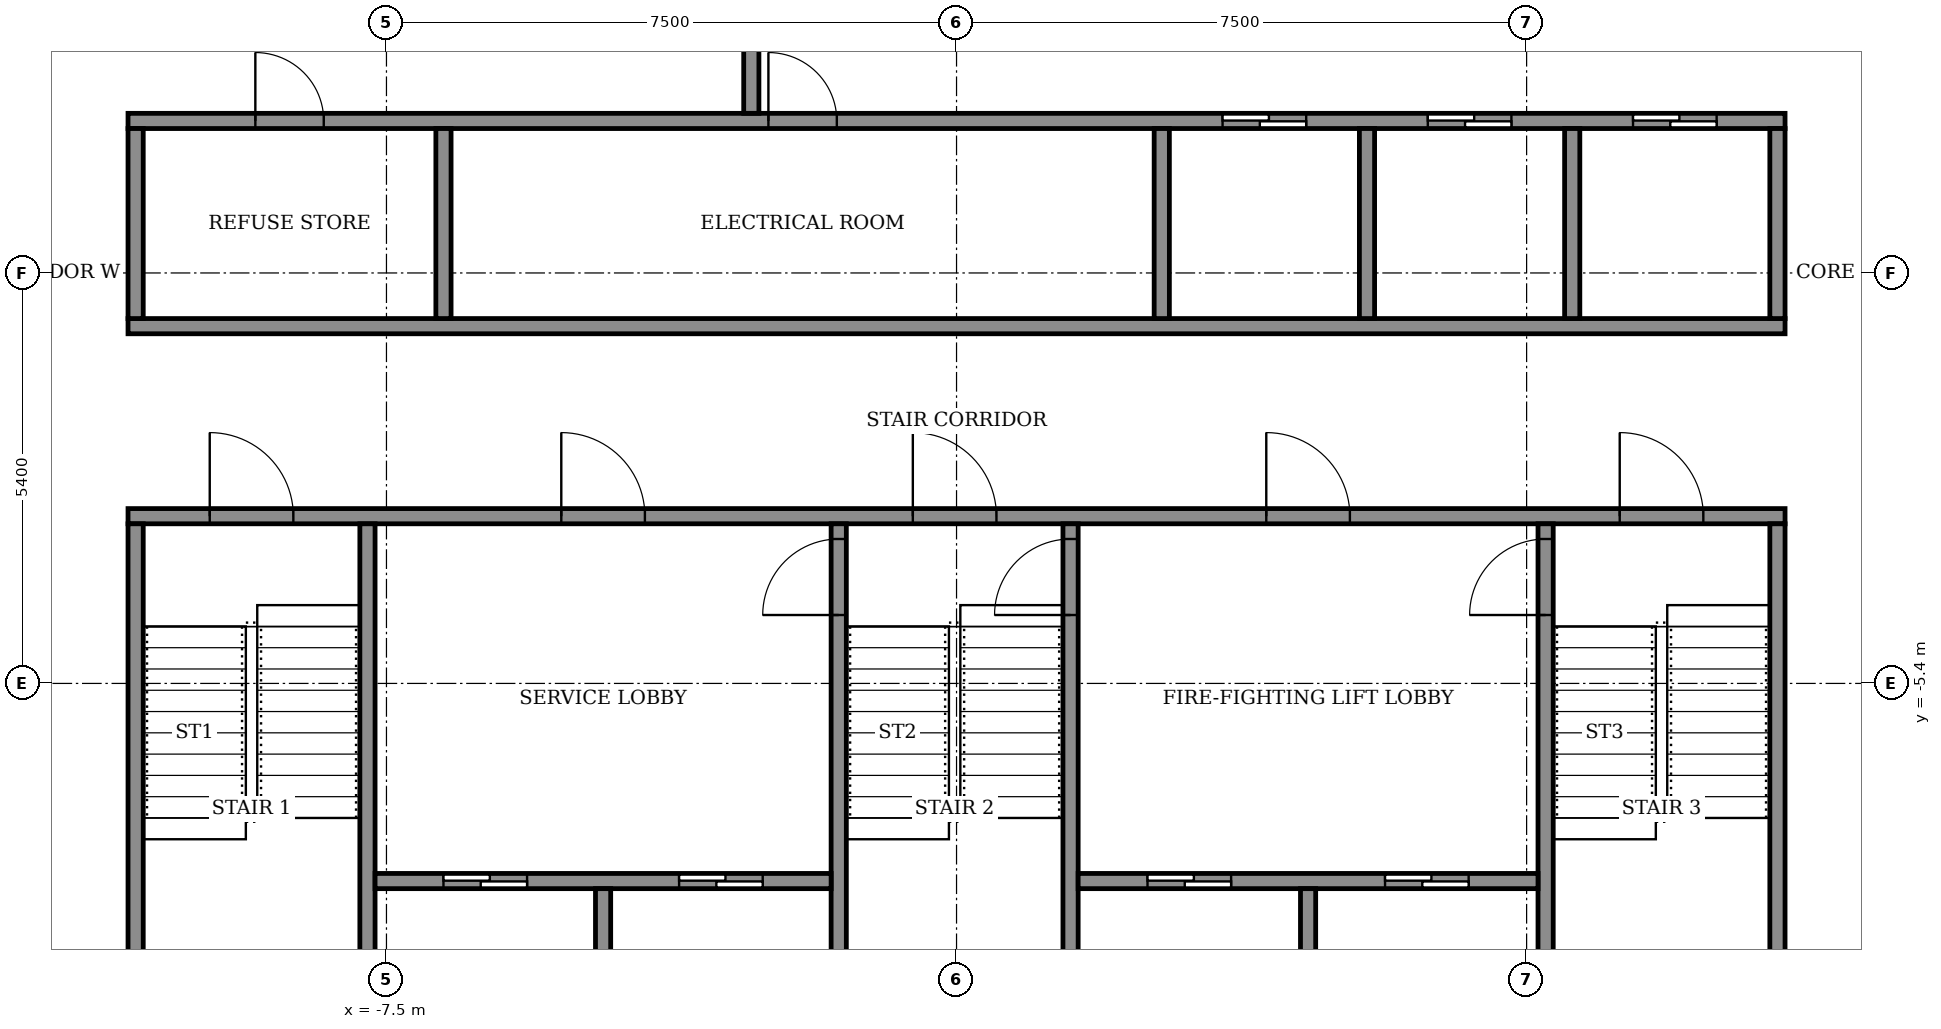
"""IFC4 building model, lengths in metres.
Left out: names, types, materials, properties, quantities, classifications, styles, units other than length and angle.
Written with IfcOpenShell. Run it as: python <this file> out.ifc"""

import sys

from ifc_helpers import new_model, si_unit, direction, frame, frame_2d, origin, place, context, subcontext, project, spatial, rectangle, extrude, element, fill, save


model = new_model("IFC4")
c1 = context("Model", 3, precision=1e-05, world=origin(), true_north=direction((0.0, 1.0)))
c2 = subcontext(c1, "Body", "Model", "MODEL_VIEW")
j1 = project(units=[si_unit("LENGTHUNIT", "METRE"), si_unit("PLANEANGLEUNIT", "RADIAN")], contexts=[c1])
p1 = place(None, origin())
s1 = spatial("IfcSite", under=j1, at=p1, CompositionType="ELEMENT")
p2 = place(p1, origin())
s2 = spatial("IfcBuilding", under=s1, at=p2, CompositionType="ELEMENT")
p3 = place(p2, frame((0.0, 0.0, 140.9)))
s3 = spatial("IfcBuildingStorey", under=s2, at=p3, CompositionType="ELEMENT", Elevation=140.9)
p4 = place(p3, frame((-10.9, -3.2, 0.0), z_axis=(0.0, 0.0, 1.0), x_axis=(1.0, 0.0, 0.0)))
e1 = element("IfcWall", 1, at=p4, inside=s3, PredefinedType="SHEAR", context=c2, shape_type="SweptSolid", body=[
    extrude(rectangle(XDim=21.8, YDim=0.2, at=frame_2d((10.9, 0.0))), origin(), (0.0, 0.0, 1.0), 3.05),
])
p5 = place(p4, frame((1.075, 0.0, 0.0)))
e2 = element("IfcOpeningElement", 2, at=p5, cuts=e1, PredefinedType="OPENING", context=c2, shape_type="SweptSolid", body=[
    extrude(rectangle(XDim=1.1, YDim=2.1, at=frame_2d((0.55, 1.05))), frame((0.0, 0.11, 0.0), z_axis=(0.0, -1.0, 0.0), x_axis=(1.0, 0.0, 0.0)), (0.0, 0.0, 1.0), 0.22),
])
p6 = place(p4, frame((10.325, 0.0, 0.0)))
e3 = element("IfcOpeningElement", 3, at=p6, cuts=e1, PredefinedType="OPENING", context=c2, shape_type="SweptSolid", body=[
    extrude(rectangle(XDim=1.1, YDim=2.1, at=frame_2d((0.55, 1.05))), frame((0.0, 0.11, 0.0), z_axis=(0.0, -1.0, 0.0), x_axis=(1.0, 0.0, 0.0)), (0.0, 0.0, 1.0), 0.22),
])
p7 = place(p4, frame((19.625, 0.0, 0.0)))
e4 = element("IfcOpeningElement", 4, at=p7, cuts=e1, PredefinedType="OPENING", context=c2, shape_type="SweptSolid", body=[
    extrude(rectangle(XDim=1.1, YDim=2.1, at=frame_2d((0.55, 1.05))), frame((0.0, 0.11, 0.0), z_axis=(0.0, -1.0, 0.0), x_axis=(1.0, 0.0, 0.0)), (0.0, 0.0, 1.0), 0.22),
])
p8 = place(p4, frame((5.7, 0.0, 0.0)))
e5 = element("IfcOpeningElement", 5, at=p8, cuts=e1, PredefinedType="OPENING", context=c2, shape_type="SweptSolid", body=[
    extrude(rectangle(XDim=1.1, YDim=2.1, at=frame_2d((0.55, 1.05))), frame((0.0, 0.11, 0.0), z_axis=(0.0, -1.0, 0.0), x_axis=(1.0, 0.0, 0.0)), (0.0, 0.0, 1.0), 0.22),
])
p9 = place(p4, frame((14.975, 0.0, 0.0)))
e6 = element("IfcOpeningElement", 6, at=p9, cuts=e1, PredefinedType="OPENING", context=c2, shape_type="SweptSolid", body=[
    extrude(rectangle(XDim=1.1, YDim=2.1, at=frame_2d((0.55, 1.05))), frame((0.0, 0.11, 0.0), z_axis=(0.0, -1.0, 0.0), x_axis=(1.0, 0.0, 0.0)), (0.0, 0.0, 1.0), 0.22),
])
p10 = place(p3, frame((-10.9, -0.7, 0.0), z_axis=(0.0, 0.0, 1.0), x_axis=(1.0, 0.0, 0.0)))
e7 = element("IfcWall", 7, at=p10, inside=s3, PredefinedType="SHEAR", context=c2, shape_type="SweptSolid", body=[
    extrude(rectangle(XDim=21.8, YDim=0.2, at=frame_2d((10.9, 0.0))), origin(), (0.0, 0.0, 1.0), 3.05),
])
p11 = place(p3, frame((-10.9, 2.0, 0.0), z_axis=(0.0, 0.0, 1.0), x_axis=(1.0, 0.0, 0.0)))
e8 = element("IfcWall", 8, at=p11, inside=s3, PredefinedType="SHEAR", context=c2, shape_type="SweptSolid", body=[
    extrude(rectangle(XDim=21.8, YDim=0.2, at=frame_2d((10.9, 0.0))), origin(), (0.0, 0.0, 1.0), 3.05),
])
p12 = place(p11, frame((14.4, 0.0, 0.0)))
e9 = element("IfcOpeningElement", 9, at=p12, cuts=e8, PredefinedType="OPENING", context=c2, shape_type="SweptSolid", body=[
    extrude(rectangle(XDim=1.1, YDim=2.1, at=frame_2d((0.55, 1.05))), frame((0.0, 0.11, 0.0), z_axis=(0.0, -1.0, 0.0), x_axis=(1.0, 0.0, 0.0)), (0.0, 0.0, 1.0), 0.22),
])
p13 = place(p11, frame((17.1, 0.0, 0.0)))
e10 = element("IfcOpeningElement", 10, at=p13, cuts=e8, PredefinedType="OPENING", context=c2, shape_type="SweptSolid", body=[
    extrude(rectangle(XDim=1.1, YDim=2.1, at=frame_2d((0.55, 1.05))), frame((0.0, 0.11, 0.0), z_axis=(0.0, -1.0, 0.0), x_axis=(1.0, 0.0, 0.0)), (0.0, 0.0, 1.0), 0.22),
])
p14 = place(p11, frame((19.8, 0.0, 0.0)))
e11 = element("IfcOpeningElement", 11, at=p14, cuts=e8, PredefinedType="OPENING", context=c2, shape_type="SweptSolid", body=[
    extrude(rectangle(XDim=1.1, YDim=2.1, at=frame_2d((0.55, 1.05))), frame((0.0, 0.11, 0.0), z_axis=(0.0, -1.0, 0.0), x_axis=(1.0, 0.0, 0.0)), (0.0, 0.0, 1.0), 0.22),
])
p15 = place(p11, frame((1.675, 0.0, 0.0)))
e12 = element("IfcOpeningElement", 12, at=p15, cuts=e8, PredefinedType="OPENING", context=c2, shape_type="SweptSolid", body=[
    extrude(rectangle(XDim=0.9, YDim=2.1, at=frame_2d((0.45, 1.05))), frame((0.0, 0.11, 0.0), z_axis=(0.0, -1.0, 0.0), x_axis=(1.0, 0.0, 0.0)), (0.0, 0.0, 1.0), 0.22),
])
p16 = place(p11, frame((8.425, 0.0, 0.0)))
e13 = element("IfcOpeningElement", 13, at=p16, cuts=e8, PredefinedType="OPENING", context=c2, shape_type="SweptSolid", body=[
    extrude(rectangle(XDim=0.9, YDim=2.1, at=frame_2d((0.45, 1.05))), frame((0.0, 0.11, 0.0), z_axis=(0.0, -1.0, 0.0), x_axis=(1.0, 0.0, 0.0)), (0.0, 0.0, 1.0), 0.22),
])
for number, where, z_axis, x_axis in (
    (14, (-10.8, -10.8, 0.0), (0.0, 0.0, 1.0), (0.0, 1.0, 0.0)),
    (15, (-7.75, -10.8, 0.0), (0.0, 0.0, 1.0), (0.0, 1.0, 0.0)),
):
    element("IfcWall", number, at=place(p3, frame(where, z_axis=z_axis, x_axis=x_axis)), inside=s3, PredefinedType="SHEAR", context=c2, shape_type="SweptSolid", body=[
        extrude(rectangle(XDim=7.5, YDim=0.2, at=frame_2d((3.75, 0.0))), origin(), (0.0, 0.0, 1.0), 3.05),
    ])
p17 = place(p3, frame((-1.55, -10.8, 0.0), z_axis=(0.0, 0.0, 1.0), x_axis=(0.0, 1.0, 0.0)))
e16 = element("IfcWall", 16, at=p17, inside=s3, PredefinedType="SHEAR", context=c2, shape_type="SweptSolid", body=[
    extrude(rectangle(XDim=7.5, YDim=0.2, at=frame_2d((3.75, 0.0))), origin(), (0.0, 0.0, 1.0), 3.05),
])
p18 = place(p17, frame((6.3, 0.0, 0.0)))
e17 = element("IfcOpeningElement", 17, at=p18, cuts=e16, PredefinedType="OPENING", context=c2, shape_type="SweptSolid", body=[
    extrude(rectangle(XDim=1.0, YDim=2.1, at=frame_2d((0.5, 1.05))), frame((0.0, 0.11, 0.0), z_axis=(0.0, -1.0, 0.0), x_axis=(1.0, 0.0, 0.0)), (0.0, 0.0, 1.0), 0.22),
])
p19 = place(p3, frame((1.5, -10.8, 0.0), z_axis=(0.0, 0.0, 1.0), x_axis=(0.0, 1.0, 0.0)))
e18 = element("IfcWall", 18, at=p19, inside=s3, PredefinedType="SHEAR", context=c2, shape_type="SweptSolid", body=[
    extrude(rectangle(XDim=7.5, YDim=0.2, at=frame_2d((3.75, 0.0))), origin(), (0.0, 0.0, 1.0), 3.05),
])
p20 = place(p19, frame((6.3, 0.0, 0.0)))
e19 = element("IfcOpeningElement", 19, at=p20, cuts=e18, PredefinedType="OPENING", context=c2, shape_type="SweptSolid", body=[
    extrude(rectangle(XDim=1.0, YDim=2.1, at=frame_2d((0.5, 1.05))), frame((0.0, 0.11, 0.0), z_axis=(0.0, -1.0, 0.0), x_axis=(1.0, 0.0, 0.0)), (0.0, 0.0, 1.0), 0.22),
])
p21 = place(p3, frame((7.75, -10.8, 0.0), z_axis=(0.0, 0.0, 1.0), x_axis=(0.0, 1.0, 0.0)))
e20 = element("IfcWall", 20, at=p21, inside=s3, PredefinedType="SHEAR", context=c2, shape_type="SweptSolid", body=[
    extrude(rectangle(XDim=7.5, YDim=0.2, at=frame_2d((3.75, 0.0))), origin(), (0.0, 0.0, 1.0), 3.05),
])
p22 = place(p21, frame((6.3, 0.0, 0.0)))
e21 = element("IfcOpeningElement", 21, at=p22, cuts=e20, PredefinedType="OPENING", context=c2, shape_type="SweptSolid", body=[
    extrude(rectangle(XDim=1.0, YDim=2.1, at=frame_2d((0.5, 1.05))), frame((0.0, 0.11, 0.0), z_axis=(0.0, -1.0, 0.0), x_axis=(1.0, 0.0, 0.0)), (0.0, 0.0, 1.0), 0.22),
])
p23 = place(p3, frame((10.8, -10.8, 0.0), z_axis=(0.0, 0.0, 1.0), x_axis=(0.0, 1.0, 0.0)))
e22 = element("IfcWall", 22, at=p23, inside=s3, PredefinedType="SHEAR", context=c2, shape_type="SweptSolid", body=[
    extrude(rectangle(XDim=7.5, YDim=0.2, at=frame_2d((3.75, 0.0))), origin(), (0.0, 0.0, 1.0), 3.05),
])
p24 = place(p3, frame((-7.65, -8.0, 0.0), z_axis=(0.0, 0.0, 1.0), x_axis=(1.0, 0.0, 0.0)))
e23 = element("IfcWall", 23, at=p24, inside=s3, PredefinedType="SHEAR", context=c2, shape_type="SweptSolid", body=[
    extrude(rectangle(XDim=6.0, YDim=0.2, at=frame_2d((3.0, 0.0))), origin(), (0.0, 0.0, 1.0), 3.05),
])
p25 = place(p24, frame((0.9, 0.0, 0.0)))
e24 = element("IfcOpeningElement", 24, at=p25, cuts=e23, PredefinedType="OPENING", context=c2, shape_type="SweptSolid", body=[
    extrude(rectangle(XDim=1.1, YDim=2.1, at=frame_2d((0.55, 1.05))), frame((0.0, 0.11, 0.0), z_axis=(0.0, -1.0, 0.0), x_axis=(1.0, 0.0, 0.0)), (0.0, 0.0, 1.0), 0.22),
])
p26 = place(p24, frame((4.0, 0.0, 0.0)))
e25 = element("IfcOpeningElement", 25, at=p26, cuts=e23, PredefinedType="OPENING", context=c2, shape_type="SweptSolid", body=[
    extrude(rectangle(XDim=1.1, YDim=2.1, at=frame_2d((0.55, 1.05))), frame((0.0, 0.11, 0.0), z_axis=(0.0, -1.0, 0.0), x_axis=(1.0, 0.0, 0.0)), (0.0, 0.0, 1.0), 0.22),
])
p27 = place(p3, frame((-4.65, -10.8, 0.0), z_axis=(0.0, 0.0, 1.0), x_axis=(0.0, 1.0, 0.0)))
e26 = element("IfcWall", 26, at=p27, inside=s3, PredefinedType="SHEAR", context=c2, shape_type="SweptSolid", body=[
    extrude(rectangle(XDim=2.7, YDim=0.2, at=frame_2d((1.35, 0.0))), origin(), (0.0, 0.0, 1.0), 3.05),
])
p28 = place(p3, frame((1.6, -8.0, 0.0), z_axis=(0.0, 0.0, 1.0), x_axis=(1.0, 0.0, 0.0)))
e27 = element("IfcWall", 27, at=p28, inside=s3, PredefinedType="SHEAR", context=c2, shape_type="SweptSolid", body=[
    extrude(rectangle(XDim=6.05, YDim=0.2, at=frame_2d((3.025, 0.0))), origin(), (0.0, 0.0, 1.0), 3.05),
])
p29 = place(p28, frame((0.913, 0.0, 0.0)))
e28 = element("IfcOpeningElement", 28, at=p29, cuts=e27, PredefinedType="OPENING", context=c2, shape_type="SweptSolid", body=[
    extrude(rectangle(XDim=1.1, YDim=2.1, at=frame_2d((0.55, 1.05))), frame((0.0, 0.11, 0.0), z_axis=(0.0, -1.0, 0.0), x_axis=(1.0, 0.0, 0.0)), (0.0, 0.0, 1.0), 0.22),
])
p30 = place(p28, frame((4.038, 0.0, 0.0)))
e29 = element("IfcOpeningElement", 29, at=p30, cuts=e27, PredefinedType="OPENING", context=c2, shape_type="SweptSolid", body=[
    extrude(rectangle(XDim=1.1, YDim=2.1, at=frame_2d((0.55, 1.05))), frame((0.0, 0.11, 0.0), z_axis=(0.0, -1.0, 0.0), x_axis=(1.0, 0.0, 0.0)), (0.0, 0.0, 1.0), 0.22),
])
p31 = place(p3, frame((4.625, -10.8, 0.0), z_axis=(0.0, 0.0, 1.0), x_axis=(0.0, 1.0, 0.0)))
e30 = element("IfcWall", 30, at=p31, inside=s3, PredefinedType="SHEAR", context=c2, shape_type="SweptSolid", body=[
    extrude(rectangle(XDim=2.7, YDim=0.2, at=frame_2d((1.35, 0.0))), origin(), (0.0, 0.0, 1.0), 3.05),
])
for number, where, z_axis, x_axis in (
    (31, (-10.8, -0.6, 0.0), (0.0, 0.0, 1.0), (0.0, 1.0, 0.0)),
    (32, (-6.75, -0.6, 0.0), (0.0, 0.0, 1.0), (0.0, 1.0, 0.0)),
):
    element("IfcWall", number, at=place(p3, frame(where, z_axis=z_axis, x_axis=x_axis)), inside=s3, PredefinedType="STANDARD", context=c2, shape_type="SweptSolid", body=[
        extrude(rectangle(XDim=2.5, YDim=0.2, at=frame_2d((1.25, 0.0))), origin(), (0.0, 0.0, 1.0), 3.05),
    ])
for number, where, z_axis, x_axis in (
    (33, (2.7, -0.6, 0.0), (0.0, 0.0, 1.0), (0.0, 1.0, 0.0)),
    (34, (5.4, -0.6, 0.0), (0.0, 0.0, 1.0), (0.0, 1.0, 0.0)),
    (35, (8.1, -0.6, 0.0), (0.0, 0.0, 1.0), (0.0, 1.0, 0.0)),
    (36, (10.8, -0.6, 0.0), (0.0, 0.0, 1.0), (0.0, 1.0, 0.0)),
):
    element("IfcWall", number, at=place(p3, frame(where, z_axis=z_axis, x_axis=x_axis)), inside=s3, PredefinedType="SHEAR", context=c2, shape_type="SweptSolid", body=[
        extrude(rectangle(XDim=2.5, YDim=0.2, at=frame_2d((1.25, 0.0))), origin(), (0.0, 0.0, 1.0), 3.05),
    ])
p32 = place(p3, frame((-2.7, 2.1, 0.0), z_axis=(0.0, 0.0, 1.0), x_axis=(0.0, 1.0, 0.0)))
e37 = element("IfcWall", 37, at=p32, inside=s3, PredefinedType="STANDARD", context=c2, shape_type="SweptSolid", body=[
    extrude(rectangle(XDim=5.9, YDim=0.2, at=frame_2d((2.95, 0.0))), origin(), (0.0, 0.0, 1.0), 3.05),
])
p33 = place(p32, frame((2.35, 0.0, 0.0)))
e38 = element("IfcOpeningElement", 38, at=p33, cuts=e37, PredefinedType="OPENING", context=c2, shape_type="SweptSolid", body=[
    extrude(rectangle(XDim=1.2, YDim=2.1, at=frame_2d((0.6, 1.05))), frame((0.0, 0.11, 0.0), z_axis=(0.0, -1.0, 0.0), x_axis=(1.0, 0.0, 0.0)), (0.0, 0.0, 1.0), 0.22),
])
p34 = place(p12, origin())
e39 = element("IfcDoor", 39, at=p34, inside=s3, OperationType="SLIDING_TO_LEFT", PredefinedType="DOOR", context=c2, shape_type="SweptSolid", body=[
    extrude(rectangle(XDim=1.1, YDim=2.1, at=frame_2d((0.55, 1.05))), frame((0.0, 0.025, 0.0), z_axis=(0.0, -1.0, 0.0), x_axis=(1.0, 0.0, 0.0)), (0.0, 0.0, 1.0), 0.05),
])
fill(e9, e39)
p35 = place(p13, origin())
e40 = element("IfcDoor", 40, at=p35, inside=s3, OperationType="SLIDING_TO_LEFT", PredefinedType="DOOR", context=c2, shape_type="SweptSolid", body=[
    extrude(rectangle(XDim=1.1, YDim=2.1, at=frame_2d((0.55, 1.05))), frame((0.0, 0.025, 0.0), z_axis=(0.0, -1.0, 0.0), x_axis=(1.0, 0.0, 0.0)), (0.0, 0.0, 1.0), 0.05),
])
fill(e10, e40)
p36 = place(p14, origin())
e41 = element("IfcDoor", 41, at=p36, inside=s3, OperationType="SLIDING_TO_LEFT", PredefinedType="DOOR", context=c2, shape_type="SweptSolid", body=[
    extrude(rectangle(XDim=1.1, YDim=2.1, at=frame_2d((0.55, 1.05))), frame((0.0, 0.025, 0.0), z_axis=(0.0, -1.0, 0.0), x_axis=(1.0, 0.0, 0.0)), (0.0, 0.0, 1.0), 0.05),
])
fill(e11, e41)
p37 = place(p15, origin())
e42 = element("IfcDoor", 42, at=p37, inside=s3, OperationType="SINGLE_SWING_RIGHT", PredefinedType="DOOR", context=c2, shape_type="SweptSolid", body=[
    extrude(rectangle(XDim=0.9, YDim=2.1, at=frame_2d((0.45, 1.05))), frame((0.0, 0.025, 0.0), z_axis=(0.0, -1.0, 0.0), x_axis=(1.0, 0.0, 0.0)), (0.0, 0.0, 1.0), 0.05),
])
fill(e12, e42)
p38 = place(p16, origin())
e43 = element("IfcDoor", 43, at=p38, inside=s3, OperationType="SINGLE_SWING_LEFT", PredefinedType="DOOR", context=c2, shape_type="SweptSolid", body=[
    extrude(rectangle(XDim=0.9, YDim=2.1, at=frame_2d((0.45, 1.05))), frame((0.0, 0.025, 0.0), z_axis=(0.0, -1.0, 0.0), x_axis=(1.0, 0.0, 0.0)), (0.0, 0.0, 1.0), 0.05),
])
fill(e13, e43)
p39 = place(p29, origin())
e44 = element("IfcDoor", 44, at=p39, inside=s3, OperationType="SLIDING_TO_LEFT", PredefinedType="DOOR", context=c2, shape_type="SweptSolid", body=[
    extrude(rectangle(XDim=1.1, YDim=2.1, at=frame_2d((0.55, 1.05))), frame((0.0, 0.025, 0.0), z_axis=(0.0, -1.0, 0.0), x_axis=(1.0, 0.0, 0.0)), (0.0, 0.0, 1.0), 0.05),
])
fill(e28, e44)
p40 = place(p25, origin())
e45 = element("IfcDoor", 45, at=p40, inside=s3, OperationType="SLIDING_TO_LEFT", PredefinedType="DOOR", context=c2, shape_type="SweptSolid", body=[
    extrude(rectangle(XDim=1.1, YDim=2.1, at=frame_2d((0.55, 1.05))), frame((0.0, 0.025, 0.0), z_axis=(0.0, -1.0, 0.0), x_axis=(1.0, 0.0, 0.0)), (0.0, 0.0, 1.0), 0.05),
])
fill(e24, e45)
p41 = place(p30, origin())
e46 = element("IfcDoor", 46, at=p41, inside=s3, OperationType="SLIDING_TO_LEFT", PredefinedType="DOOR", context=c2, shape_type="SweptSolid", body=[
    extrude(rectangle(XDim=1.1, YDim=2.1, at=frame_2d((0.55, 1.05))), frame((0.0, 0.025, 0.0), z_axis=(0.0, -1.0, 0.0), x_axis=(1.0, 0.0, 0.0)), (0.0, 0.0, 1.0), 0.05),
])
fill(e29, e46)
p42 = place(p26, origin())
e47 = element("IfcDoor", 47, at=p42, inside=s3, OperationType="SLIDING_TO_LEFT", PredefinedType="DOOR", context=c2, shape_type="SweptSolid", body=[
    extrude(rectangle(XDim=1.1, YDim=2.1, at=frame_2d((0.55, 1.05))), frame((0.0, 0.025, 0.0), z_axis=(0.0, -1.0, 0.0), x_axis=(1.0, 0.0, 0.0)), (0.0, 0.0, 1.0), 0.05),
])
fill(e25, e47)
p43 = place(p5, origin())
e48 = element("IfcDoor", 48, at=p43, inside=s3, OperationType="SINGLE_SWING_RIGHT", PredefinedType="DOOR", context=c2, shape_type="SweptSolid", body=[
    extrude(rectangle(XDim=1.1, YDim=2.1, at=frame_2d((0.55, 1.05))), frame((0.0, 0.025, 0.0), z_axis=(0.0, -1.0, 0.0), x_axis=(1.0, 0.0, 0.0)), (0.0, 0.0, 1.0), 0.05),
])
fill(e2, e48)
p44 = place(p6, origin())
e49 = element("IfcDoor", 49, at=p44, inside=s3, OperationType="SINGLE_SWING_RIGHT", PredefinedType="DOOR", context=c2, shape_type="SweptSolid", body=[
    extrude(rectangle(XDim=1.1, YDim=2.1, at=frame_2d((0.55, 1.05))), frame((0.0, 0.025, 0.0), z_axis=(0.0, -1.0, 0.0), x_axis=(1.0, 0.0, 0.0)), (0.0, 0.0, 1.0), 0.05),
])
fill(e3, e49)
p45 = place(p7, origin())
e50 = element("IfcDoor", 50, at=p45, inside=s3, OperationType="SINGLE_SWING_RIGHT", PredefinedType="DOOR", context=c2, shape_type="SweptSolid", body=[
    extrude(rectangle(XDim=1.1, YDim=2.1, at=frame_2d((0.55, 1.05))), frame((0.0, 0.025, 0.0), z_axis=(0.0, -1.0, 0.0), x_axis=(1.0, 0.0, 0.0)), (0.0, 0.0, 1.0), 0.05),
])
fill(e4, e50)
p46 = place(p8, origin())
e51 = element("IfcDoor", 51, at=p46, inside=s3, OperationType="SINGLE_SWING_LEFT", PredefinedType="DOOR", context=c2, shape_type="SweptSolid", body=[
    extrude(rectangle(XDim=1.1, YDim=2.1, at=frame_2d((0.55, 1.05))), frame((0.0, 0.025, 0.0), z_axis=(0.0, -1.0, 0.0), x_axis=(1.0, 0.0, 0.0)), (0.0, 0.0, 1.0), 0.05),
])
fill(e5, e51)
p47 = place(p9, origin())
e52 = element("IfcDoor", 52, at=p47, inside=s3, OperationType="SINGLE_SWING_LEFT", PredefinedType="DOOR", context=c2, shape_type="SweptSolid", body=[
    extrude(rectangle(XDim=1.1, YDim=2.1, at=frame_2d((0.55, 1.05))), frame((0.0, 0.025, 0.0), z_axis=(0.0, -1.0, 0.0), x_axis=(1.0, 0.0, 0.0)), (0.0, 0.0, 1.0), 0.05),
])
fill(e6, e52)
p48 = place(p18, origin())
e53 = element("IfcDoor", 53, at=p48, inside=s3, OperationType="SINGLE_SWING_RIGHT", PredefinedType="DOOR", context=c2, shape_type="SweptSolid", body=[
    extrude(rectangle(XDim=1.0, YDim=2.1, at=frame_2d((0.5, 1.05))), frame((0.0, 0.025, 0.0), z_axis=(0.0, -1.0, 0.0), x_axis=(1.0, 0.0, 0.0)), (0.0, 0.0, 1.0), 0.05),
])
fill(e17, e53)
p49 = place(p20, origin())
e54 = element("IfcDoor", 54, at=p49, inside=s3, OperationType="SINGLE_SWING_RIGHT", PredefinedType="DOOR", context=c2, shape_type="SweptSolid", body=[
    extrude(rectangle(XDim=1.0, YDim=2.1, at=frame_2d((0.5, 1.05))), frame((0.0, 0.025, 0.0), z_axis=(0.0, -1.0, 0.0), x_axis=(1.0, 0.0, 0.0)), (0.0, 0.0, 1.0), 0.05),
])
fill(e19, e54)
p50 = place(p22, origin())
e55 = element("IfcDoor", 55, at=p50, inside=s3, OperationType="SINGLE_SWING_RIGHT", PredefinedType="DOOR", context=c2, shape_type="SweptSolid", body=[
    extrude(rectangle(XDim=1.0, YDim=2.1, at=frame_2d((0.5, 1.05))), frame((0.0, 0.025, 0.0), z_axis=(0.0, -1.0, 0.0), x_axis=(1.0, 0.0, 0.0)), (0.0, 0.0, 1.0), 0.05),
])
fill(e21, e55)
save(model, sys.argv[1])
